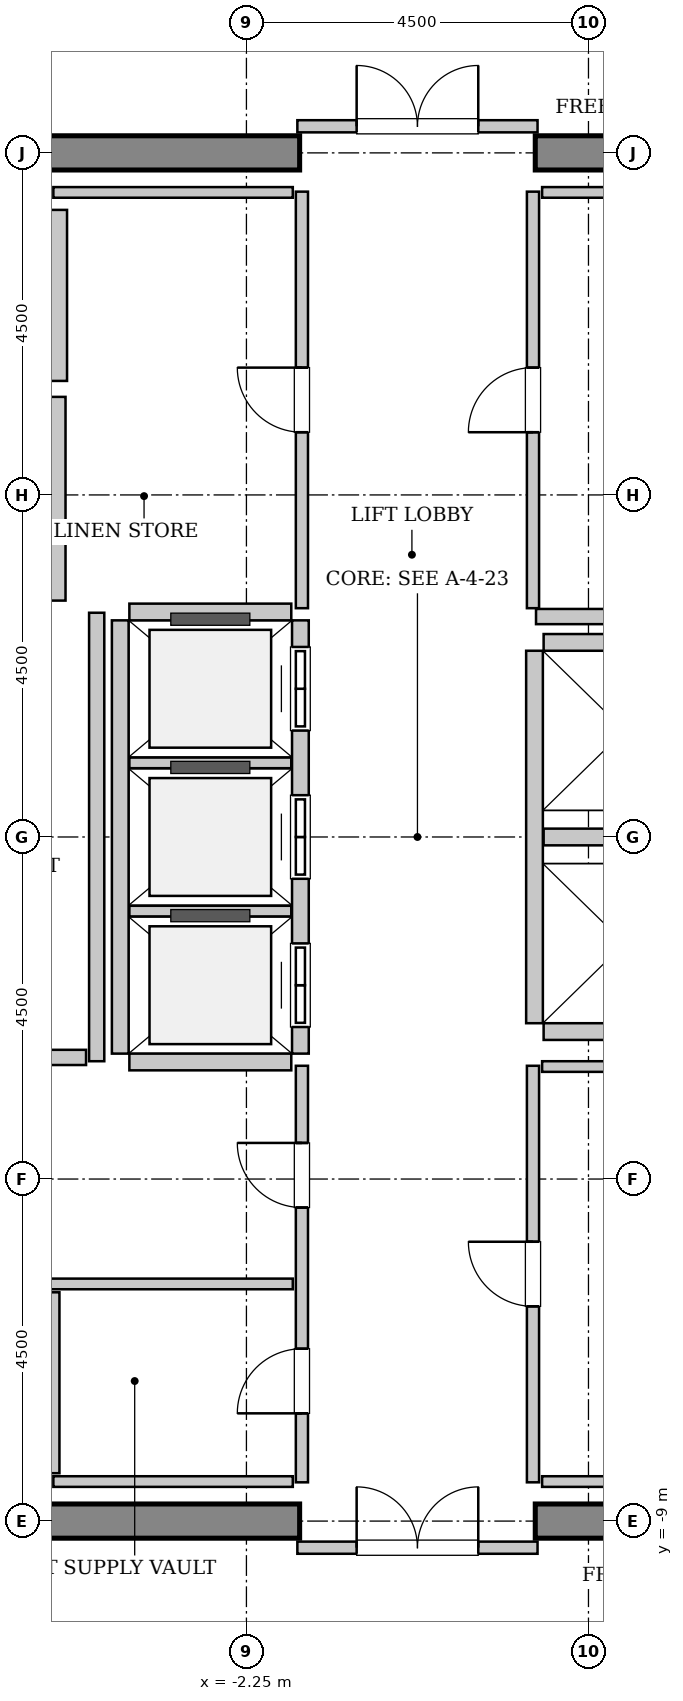
"""IFC4 building model, lengths in metres.
Left out: names, types, materials, properties, quantities, classifications, styles, units other than length and angle.
Written with IfcOpenShell. Run it as: python <this file> out.ifc"""

import sys

from ifc_helpers import new_model, si_unit, direction, frame, frame_2d, origin, place, context, subcontext, project, spatial, rectangle, extrude, source, transform, mapped, element, fill, save


model = new_model("IFC4")
c1 = context("Model", 3, precision=1e-05, world=origin(), true_north=direction((0.0, 1.0)))
c2 = subcontext(c1, "Body", "Model", "MODEL_VIEW")
j1 = project(units=[si_unit("LENGTHUNIT", "METRE"), si_unit("PLANEANGLEUNIT", "RADIAN")], contexts=[c1])
p1 = place(None, origin())
s1 = spatial("IfcSite", under=j1, at=p1, CompositionType="ELEMENT")
p2 = place(p1, origin())
s2 = spatial("IfcBuilding", under=s1, at=p2, CompositionType="ELEMENT")
p3 = place(p2, frame((0.0, 0.0, 291.2)))
s3 = spatial("IfcBuildingStorey", under=s2, at=p3, CompositionType="ELEMENT", Elevation=291.2)
m1 = source(origin(), c2, "Body", "SweptSolid", [
    extrude(rectangle(XDim=9.925, YDim=0.45, at=frame_2d((4.962, 0.0))), origin(), (0.0, 0.0, 1.0), 3.8),
])
for number, where, z_axis, x_axis in (
    (1, (-11.475, 9.0, 0.0), (0.0, 0.0, 1.0), (1.0, 0.0, 0.0)),
    (2, (1.55, 9.0, 0.0), (0.0, 0.0, 1.0), (1.0, 0.0, 0.0)),
    (3, (-11.475, -9.0, 0.0), (0.0, 0.0, 1.0), (1.0, 0.0, 0.0)),
    (4, (1.55, -9.0, 0.0), (0.0, 0.0, 1.0), (1.0, 0.0, 0.0)),
):
    element("IfcWall", number, at=place(p3, frame(where, z_axis=z_axis, x_axis=x_axis)), inside=s3, PredefinedType="SHEAR", context=c2, shape_type="MappedRepresentation", body=[
        mapped(m1, transform((0.0, 0.0, 0.0), x_axis=(1.0, 0.0, 0.0), y_axis=(0.0, 1.0, 0.0), z_axis=(0.0, 0.0, 1.0), scale=1.0)),
    ])
m2 = source(origin(), c2, "Body", "SweptSolid", [
    extrude(rectangle(XDim=2.68, YDim=0.22, at=frame_2d((1.34, 0.0))), origin(), (0.0, 0.0, 1.0), 3.535),
])
p4 = place(p3, frame((-4.74, 3.11, 0.0), z_axis=(0.0, 0.0, 1.0), x_axis=(0.0, 1.0, 0.0)))
e5 = element("IfcWall", 5, at=p4, inside=s3, PredefinedType="SOLIDWALL", context=c2, shape_type="MappedRepresentation", body=[
    mapped(m2, transform((0.0, 0.0, 0.0), x_axis=(1.0, 0.0, 0.0), y_axis=(0.0, 1.0, 0.0), z_axis=(0.0, 0.0, 1.0), scale=1.0)),
])
m3 = source(origin(), c2, "Body", "SweptSolid", [
    extrude(rectangle(XDim=5.7, YDim=0.22, at=frame_2d((2.85, 0.0))), origin(), (0.0, 0.0, 1.0), 3.535),
])
p5 = place(p3, frame((-1.54, -2.85, 0.0), z_axis=(0.0, 0.0, 1.0), x_axis=(0.0, 1.0, 0.0)))
e6 = element("IfcWall", 6, at=p5, inside=s3, PredefinedType="SOLIDWALL", context=c2, shape_type="MappedRepresentation", body=[
    mapped(m3, transform((0.0, 0.0, 0.0), x_axis=(1.0, 0.0, 0.0), y_axis=(0.0, 1.0, 0.0), z_axis=(0.0, 0.0, 1.0), scale=1.0)),
])
p6 = place(p5, frame((0.35, 0.0, 0.0)))
e7 = element("IfcOpeningElement", 7, at=p6, cuts=e6, PredefinedType="OPENING", context=c2, shape_type="SweptSolid", body=[
    extrude(rectangle(XDim=1.1, YDim=2.2, at=frame_2d((0.55, 1.1))), frame((0.0, 0.12, 0.0), z_axis=(0.0, -1.0, 0.0), x_axis=(1.0, 0.0, 0.0)), (0.0, 0.0, 1.0), 0.24),
])
p7 = place(p5, frame((2.3, 0.0, 0.0)))
e8 = element("IfcOpeningElement", 8, at=p7, cuts=e6, PredefinedType="OPENING", context=c2, shape_type="SweptSolid", body=[
    extrude(rectangle(XDim=1.1, YDim=2.2, at=frame_2d((0.55, 1.1))), frame((0.0, 0.12, 0.0), z_axis=(0.0, -1.0, 0.0), x_axis=(1.0, 0.0, 0.0)), (0.0, 0.0, 1.0), 0.24),
])
p8 = place(p5, frame((4.25, 0.0, 0.0)))
e9 = element("IfcOpeningElement", 9, at=p8, cuts=e6, PredefinedType="OPENING", context=c2, shape_type="SweptSolid", body=[
    extrude(rectangle(XDim=1.1, YDim=2.2, at=frame_2d((0.55, 1.1))), frame((0.0, 0.12, 0.0), z_axis=(0.0, -1.0, 0.0), x_axis=(1.0, 0.0, 0.0)), (0.0, 0.0, 1.0), 0.24),
])
p9 = place(p3, frame((-3.91, 2.85, 0.0), z_axis=(0.0, 0.0, 1.0), x_axis=(0.0, -1.0, 0.0)))
e10 = element("IfcWall", 10, at=p9, inside=s3, PredefinedType="SOLIDWALL", context=c2, shape_type="MappedRepresentation", body=[
    mapped(m3, transform((0.0, 0.0, 0.0), x_axis=(1.0, 0.0, 0.0), y_axis=(0.0, 1.0, 0.0), z_axis=(0.0, 0.0, 1.0), scale=1.0)),
])
m4 = source(origin(), c2, "Body", "SweptSolid", [
    extrude(rectangle(XDim=2.13, YDim=0.22, at=frame_2d((1.065, 0.0))), origin(), (0.0, 0.0, 1.0), 3.535),
])
p10 = place(p3, frame((-3.79, -2.96, 0.0), z_axis=(0.0, 0.0, 1.0), x_axis=(1.0, 0.0, 0.0)))
e11 = element("IfcWall", 11, at=p10, inside=s3, PredefinedType="SOLIDWALL", context=c2, shape_type="MappedRepresentation", body=[
    mapped(m4, transform((0.0, 0.0, 0.0), x_axis=(1.0, 0.0, 0.0), y_axis=(0.0, 1.0, 0.0), z_axis=(0.0, 0.0, 1.0), scale=1.0)),
])
m5 = source(origin(), c2, "Body", "SweptSolid", [
    extrude(rectangle(XDim=2.13, YDim=0.14, at=frame_2d((1.065, 0.0))), origin(), (0.0, 0.0, 1.0), 3.535),
])
for number, where, z_axis, x_axis in (
    (12, (-3.79, -0.975, 0.0), (0.0, 0.0, 1.0), (1.0, 0.0, 0.0)),
    (13, (-3.79, 0.975, 0.0), (0.0, 0.0, 1.0), (1.0, 0.0, 0.0)),
):
    element("IfcWall", number, at=place(p3, frame(where, z_axis=z_axis, x_axis=x_axis)), inside=s3, PredefinedType="PARTITIONING", context=c2, shape_type="MappedRepresentation", body=[
        mapped(m5, transform((0.0, 0.0, 0.0), x_axis=(1.0, 0.0, 0.0), y_axis=(0.0, 1.0, 0.0), z_axis=(0.0, 0.0, 1.0), scale=1.0)),
    ])
p11 = place(p3, frame((-1.66, 2.96, 0.0), z_axis=(0.0, 0.0, 1.0), x_axis=(-1.0, 0.0, 0.0)))
e14 = element("IfcWall", 14, at=p11, inside=s3, PredefinedType="SOLIDWALL", context=c2, shape_type="MappedRepresentation", body=[
    mapped(m4, transform((0.0, 0.0, 0.0), x_axis=(1.0, 0.0, 0.0), y_axis=(0.0, 1.0, 0.0), z_axis=(0.0, 0.0, 1.0), scale=1.0)),
])
m6 = source(origin(), c2, "Body", "SweptSolid", [
    extrude(rectangle(XDim=4.9, YDim=0.22, at=frame_2d((2.45, 0.0))), origin(), (0.0, 0.0, 1.0), 3.535),
])
p12 = place(p3, frame((1.54, 2.45, 0.0), z_axis=(0.0, 0.0, 1.0), x_axis=(0.0, -1.0, 0.0)))
e15 = element("IfcWall", 15, at=p12, inside=s3, PredefinedType="SOLIDWALL", context=c2, shape_type="MappedRepresentation", body=[
    mapped(m6, transform((0.0, 0.0, 0.0), x_axis=(1.0, 0.0, 0.0), y_axis=(0.0, 1.0, 0.0), z_axis=(0.0, 0.0, 1.0), scale=1.0)),
])
for number, where, z_axis, x_axis in (
    (16, (1.66, -2.56, 0.0), (0.0, 0.0, 1.0), (1.0, 0.0, 0.0)),
    (17, (1.66, 0.0, 0.0), (0.0, 0.0, 1.0), (1.0, 0.0, 0.0)),
    (18, (3.79, 2.56, 0.0), (0.0, 0.0, 1.0), (-1.0, 0.0, 0.0)),
):
    element("IfcWall", number, at=place(p3, frame(where, z_axis=z_axis, x_axis=x_axis)), inside=s3, PredefinedType="SOLIDWALL", context=c2, shape_type="MappedRepresentation", body=[
        mapped(m4, transform((0.0, 0.0, 0.0), x_axis=(1.0, 0.0, 0.0), y_axis=(0.0, 1.0, 0.0), z_axis=(0.0, 0.0, 1.0), scale=1.0)),
    ])
m7 = source(origin(), c2, "Body", "SweptSolid", [
    extrude(rectangle(XDim=2.25, YDim=0.22, at=frame_2d((1.125, 0.0))), origin(), (0.0, 0.0, 1.0), 3.535),
])
p13 = place(p3, frame((-4.72, 6.0, 0.0), z_axis=(0.0, 0.0, 1.0), x_axis=(0.0, 1.0, 0.0)))
e19 = element("IfcWall", 19, at=p13, inside=s3, PredefinedType="SOLIDWALL", context=c2, shape_type="MappedRepresentation", body=[
    mapped(m7, transform((0.0, 0.0, 0.0), x_axis=(1.0, 0.0, 0.0), y_axis=(0.0, 1.0, 0.0), z_axis=(0.0, 0.0, 1.0), scale=1.0)),
])
m8 = source(origin(), c2, "Body", "SweptSolid", [
    extrude(rectangle(XDim=5.9, YDim=0.2, at=frame_2d((2.95, 0.0))), origin(), (0.0, 0.0, 1.0), 3.535),
])
p14 = place(p3, frame((-4.22, -2.95, 0.0), z_axis=(0.0, 0.0, 1.0), x_axis=(0.0, 1.0, 0.0)))
e20 = element("IfcWall", 20, at=p14, inside=s3, PredefinedType="PARTITIONING", context=c2, shape_type="MappedRepresentation", body=[
    mapped(m8, transform((0.0, 0.0, 0.0), x_axis=(1.0, 0.0, 0.0), y_axis=(0.0, 1.0, 0.0), z_axis=(0.0, 0.0, 1.0), scale=1.0)),
])
m9 = source(origin(), c2, "Body", "SweptSolid", [
    extrude(rectangle(XDim=2.9, YDim=0.2, at=frame_2d((1.45, 0.0))), origin(), (0.0, 0.0, 1.0), 3.535),
])
p15 = place(p3, frame((-7.26, -2.9, 0.0), z_axis=(0.0, 0.0, 1.0), x_axis=(1.0, 0.0, 0.0)))
e21 = element("IfcWall", 21, at=p15, inside=s3, PredefinedType="PARTITIONING", context=c2, shape_type="MappedRepresentation", body=[
    mapped(m9, transform((0.0, 0.0, 0.0), x_axis=(1.0, 0.0, 0.0), y_axis=(0.0, 1.0, 0.0), z_axis=(0.0, 0.0, 1.0), scale=1.0)),
])
m10 = source(origin(), c2, "Body", "SweptSolid", [
    extrude(rectangle(XDim=2.52, YDim=0.2, at=frame_2d((1.26, 0.0))), origin(), (0.0, 0.0, 1.0), 3.535),
])
p16 = place(p3, frame((1.56, 2.9, 0.0), z_axis=(0.0, 0.0, 1.0), x_axis=(1.0, 0.0, 0.0)))
e22 = element("IfcWall", 22, at=p16, inside=s3, PredefinedType="PARTITIONING", context=c2, shape_type="MappedRepresentation", body=[
    mapped(m10, transform((0.0, 0.0, 0.0), x_axis=(1.0, 0.0, 0.0), y_axis=(0.0, 1.0, 0.0), z_axis=(0.0, 0.0, 1.0), scale=1.0)),
])
m11 = source(origin(), c2, "Body", "SweptSolid", [
    extrude(rectangle(XDim=3.16, YDim=0.16, at=frame_2d((1.58, 0.0))), origin(), (0.0, 0.0, 1.0), 2.625),
])
p17 = place(p3, frame((-1.58, 9.35, 0.0), z_axis=(0.0, 0.0, 1.0), x_axis=(1.0, 0.0, 0.0)))
e23 = element("IfcWall", 23, at=p17, inside=s3, PredefinedType="PARTITIONING", context=c2, shape_type="MappedRepresentation", body=[
    mapped(m11, transform((0.0, 0.0, 0.0), x_axis=(1.0, 0.0, 0.0), y_axis=(0.0, 1.0, 0.0), z_axis=(0.0, 0.0, 1.0), scale=1.0)),
])
p18 = place(p17, frame((0.78, 0.0, 0.0)))
e24 = element("IfcOpeningElement", 24, at=p18, cuts=e23, PredefinedType="OPENING", context=c2, shape_type="SweptSolid", body=[
    extrude(rectangle(XDim=1.6, YDim=2.3, at=frame_2d((0.8, 1.15))), frame((0.0, 0.09, 0.0), z_axis=(0.0, -1.0, 0.0), x_axis=(1.0, 0.0, 0.0)), (0.0, 0.0, 1.0), 0.18),
])
p19 = place(p3, frame((-1.58, -9.35, 0.0), z_axis=(0.0, 0.0, 1.0), x_axis=(1.0, 0.0, 0.0)))
e25 = element("IfcWall", 25, at=p19, inside=s3, PredefinedType="PARTITIONING", context=c2, shape_type="MappedRepresentation", body=[
    mapped(m11, transform((0.0, 0.0, 0.0), x_axis=(1.0, 0.0, 0.0), y_axis=(0.0, 1.0, 0.0), z_axis=(0.0, 0.0, 1.0), scale=1.0)),
])
p20 = place(p19, frame((0.78, 0.0, 0.0)))
e26 = element("IfcOpeningElement", 26, at=p20, cuts=e25, PredefinedType="OPENING", context=c2, shape_type="SweptSolid", body=[
    extrude(rectangle(XDim=1.6, YDim=2.3, at=frame_2d((0.8, 1.15))), frame((0.0, 0.09, 0.0), z_axis=(0.0, -1.0, 0.0), x_axis=(1.0, 0.0, 0.0)), (0.0, 0.0, 1.0), 0.18),
])
m12 = source(origin(), c2, "Body", "SweptSolid", [
    extrude(rectangle(XDim=5.48, YDim=0.16, at=frame_2d((2.74, 0.0))), origin(), (0.0, 0.0, 1.0), 3.535),
])
p21 = place(p3, frame((-1.52, 3.01, 0.0), z_axis=(0.0, 0.0, 1.0), x_axis=(0.0, 1.0, 0.0)))
e27 = element("IfcWall", 27, at=p21, inside=s3, PredefinedType="PARTITIONING", context=c2, shape_type="MappedRepresentation", body=[
    mapped(m12, transform((0.0, 0.0, 0.0), x_axis=(1.0, 0.0, 0.0), y_axis=(0.0, 1.0, 0.0), z_axis=(0.0, 0.0, 1.0), scale=1.0)),
])
p22 = place(p21, frame((2.315, 0.0, 0.0)))
e28 = element("IfcOpeningElement", 28, at=p22, cuts=e27, PredefinedType="OPENING", context=c2, shape_type="SweptSolid", body=[
    extrude(rectangle(XDim=0.85, YDim=2.1, at=frame_2d((0.425, 1.05))), frame((0.0, 0.09, 0.0), z_axis=(0.0, -1.0, 0.0), x_axis=(1.0, 0.0, 0.0)), (0.0, 0.0, 1.0), 0.18),
])
m13 = source(origin(), c2, "Body", "SweptSolid", [
    extrude(rectangle(XDim=3.15, YDim=0.14, at=frame_2d((1.575, 0.0))), origin(), (0.0, 0.0, 1.0), 3.535),
])
p23 = place(p3, frame((-4.79, 8.48, 0.0), z_axis=(0.0, 0.0, 1.0), x_axis=(1.0, 0.0, 0.0)))
e29 = element("IfcWall", 29, at=p23, inside=s3, PredefinedType="PARTITIONING", context=c2, shape_type="MappedRepresentation", body=[
    mapped(m13, transform((0.0, 0.0, 0.0), x_axis=(1.0, 0.0, 0.0), y_axis=(0.0, 1.0, 0.0), z_axis=(0.0, 0.0, 1.0), scale=1.0)),
])
p24 = place(p3, frame((-1.52, -8.49, 0.0), z_axis=(0.0, 0.0, 1.0), x_axis=(0.0, 1.0, 0.0)))
e30 = element("IfcWall", 30, at=p24, inside=s3, PredefinedType="PARTITIONING", context=c2, shape_type="MappedRepresentation", body=[
    mapped(m12, transform((0.0, 0.0, 0.0), x_axis=(1.0, 0.0, 0.0), y_axis=(0.0, 1.0, 0.0), z_axis=(0.0, 0.0, 1.0), scale=1.0)),
])
p25 = place(p24, frame((0.907, 0.0, 0.0)))
e31 = element("IfcOpeningElement", 31, at=p25, cuts=e30, PredefinedType="OPENING", context=c2, shape_type="SweptSolid", body=[
    extrude(rectangle(XDim=0.85, YDim=2.1, at=frame_2d((0.425, 1.05))), frame((0.0, 0.09, 0.0), z_axis=(0.0, -1.0, 0.0), x_axis=(1.0, 0.0, 0.0)), (0.0, 0.0, 1.0), 0.18),
])
p26 = place(p24, frame((3.615, 0.0, 0.0)))
e32 = element("IfcOpeningElement", 32, at=p26, cuts=e30, PredefinedType="OPENING", context=c2, shape_type="SweptSolid", body=[
    extrude(rectangle(XDim=0.85, YDim=2.1, at=frame_2d((0.425, 1.05))), frame((0.0, 0.09, 0.0), z_axis=(0.0, -1.0, 0.0), x_axis=(1.0, 0.0, 0.0)), (0.0, 0.0, 1.0), 0.18),
])
m14 = source(origin(), c2, "Body", "SweptSolid", [
    extrude(rectangle(XDim=5.55, YDim=0.14, at=frame_2d((2.775, 0.0))), origin(), (0.0, 0.0, 1.0), 3.535),
])
p27 = place(p3, frame((-7.19, -5.88, 0.0), z_axis=(0.0, 0.0, 1.0), x_axis=(1.0, 0.0, 0.0)))
e33 = element("IfcWall", 33, at=p27, inside=s3, PredefinedType="PARTITIONING", context=c2, shape_type="MappedRepresentation", body=[
    mapped(m14, transform((0.0, 0.0, 0.0), x_axis=(1.0, 0.0, 0.0), y_axis=(0.0, 1.0, 0.0), z_axis=(0.0, 0.0, 1.0), scale=1.0)),
])
p28 = place(p3, frame((1.52, 3.01, 0.0), z_axis=(0.0, 0.0, 1.0), x_axis=(0.0, 1.0, 0.0)))
e34 = element("IfcWall", 34, at=p28, inside=s3, PredefinedType="PARTITIONING", context=c2, shape_type="MappedRepresentation", body=[
    mapped(m12, transform((0.0, 0.0, 0.0), x_axis=(1.0, 0.0, 0.0), y_axis=(0.0, 1.0, 0.0), z_axis=(0.0, 0.0, 1.0), scale=1.0)),
])
p29 = place(p28, frame((2.315, 0.0, 0.0)))
e35 = element("IfcOpeningElement", 35, at=p29, cuts=e34, PredefinedType="OPENING", context=c2, shape_type="SweptSolid", body=[
    extrude(rectangle(XDim=0.85, YDim=2.1, at=frame_2d((0.425, 1.05))), frame((0.0, 0.09, 0.0), z_axis=(0.0, -1.0, 0.0), x_axis=(1.0, 0.0, 0.0)), (0.0, 0.0, 1.0), 0.18),
])
for number, where, z_axis, x_axis in (
    (36, (1.64, 8.48, 0.0), (0.0, 0.0, 1.0), (1.0, 0.0, 0.0)),
    (37, (-4.79, -8.48, 0.0), (0.0, 0.0, 1.0), (1.0, 0.0, 0.0)),
):
    element("IfcWall", number, at=place(p3, frame(where, z_axis=z_axis, x_axis=x_axis)), inside=s3, PredefinedType="PARTITIONING", context=c2, shape_type="MappedRepresentation", body=[
        mapped(m13, transform((0.0, 0.0, 0.0), x_axis=(1.0, 0.0, 0.0), y_axis=(0.0, 1.0, 0.0), z_axis=(0.0, 0.0, 1.0), scale=1.0)),
    ])
m15 = source(origin(), c2, "Body", "SweptSolid", [
    extrude(rectangle(XDim=2.38, YDim=0.14, at=frame_2d((1.19, 0.0))), origin(), (0.0, 0.0, 1.0), 3.535),
])
p30 = place(p3, frame((-4.78, -8.37, 0.0), z_axis=(0.0, 0.0, 1.0), x_axis=(0.0, 1.0, 0.0)))
e38 = element("IfcWall", 38, at=p30, inside=s3, PredefinedType="PARTITIONING", context=c2, shape_type="MappedRepresentation", body=[
    mapped(m15, transform((0.0, 0.0, 0.0), x_axis=(1.0, 0.0, 0.0), y_axis=(0.0, 1.0, 0.0), z_axis=(0.0, 0.0, 1.0), scale=1.0)),
])
p31 = place(p3, frame((1.52, -8.49, 0.0), z_axis=(0.0, 0.0, 1.0), x_axis=(0.0, 1.0, 0.0)))
e39 = element("IfcWall", 39, at=p31, inside=s3, PredefinedType="PARTITIONING", context=c2, shape_type="MappedRepresentation", body=[
    mapped(m12, transform((0.0, 0.0, 0.0), x_axis=(1.0, 0.0, 0.0), y_axis=(0.0, 1.0, 0.0), z_axis=(0.0, 0.0, 1.0), scale=1.0)),
])
p32 = place(p31, frame((2.315, 0.0, 0.0)))
e40 = element("IfcOpeningElement", 40, at=p32, cuts=e39, PredefinedType="OPENING", context=c2, shape_type="SweptSolid", body=[
    extrude(rectangle(XDim=0.85, YDim=2.1, at=frame_2d((0.425, 1.05))), frame((0.0, 0.09, 0.0), z_axis=(0.0, -1.0, 0.0), x_axis=(1.0, 0.0, 0.0)), (0.0, 0.0, 1.0), 0.18),
])
for number, where, z_axis, x_axis in (
    (41, (1.64, -3.02, 0.0), (0.0, 0.0, 1.0), (1.0, 0.0, 0.0)),
    (42, (1.64, -8.48, 0.0), (0.0, 0.0, 1.0), (1.0, 0.0, 0.0)),
):
    element("IfcWall", number, at=place(p3, frame(where, z_axis=z_axis, x_axis=x_axis)), inside=s3, PredefinedType="PARTITIONING", context=c2, shape_type="MappedRepresentation", body=[
        mapped(m13, transform((0.0, 0.0, 0.0), x_axis=(1.0, 0.0, 0.0), y_axis=(0.0, 1.0, 0.0), z_axis=(0.0, 0.0, 1.0), scale=1.0)),
    ])
m16 = source(origin(), c2, "Body", "SweptSolid", [
    extrude(rectangle(XDim=1.1, YDim=2.2, at=frame_2d((0.55, 1.1))), frame((0.0, 0.025, 0.0), z_axis=(0.0, -1.0, 0.0), x_axis=(1.0, 0.0, 0.0)), (0.0, 0.0, 1.0), 0.05),
])
p33 = place(p6, origin())
e43 = element("IfcDoor", 43, at=p33, inside=s3, OperationType="DOUBLE_DOOR_SLIDING", PredefinedType="DOOR", context=c2, shape_type="MappedRepresentation", body=[
    mapped(m16, transform((0.0, 0.0, 0.0), x_axis=(1.0, 0.0, 0.0), y_axis=(0.0, 1.0, 0.0), z_axis=(0.0, 0.0, 1.0), scale=1.0)),
])
fill(e7, e43)
p34 = place(p7, origin())
e44 = element("IfcDoor", 44, at=p34, inside=s3, OperationType="DOUBLE_DOOR_SLIDING", PredefinedType="DOOR", context=c2, shape_type="MappedRepresentation", body=[
    mapped(m16, transform((0.0, 0.0, 0.0), x_axis=(1.0, 0.0, 0.0), y_axis=(0.0, 1.0, 0.0), z_axis=(0.0, 0.0, 1.0), scale=1.0)),
])
fill(e8, e44)
p35 = place(p8, origin())
e45 = element("IfcDoor", 45, at=p35, inside=s3, OperationType="DOUBLE_DOOR_SLIDING", PredefinedType="DOOR", context=c2, shape_type="MappedRepresentation", body=[
    mapped(m16, transform((0.0, 0.0, 0.0), x_axis=(1.0, 0.0, 0.0), y_axis=(0.0, 1.0, 0.0), z_axis=(0.0, 0.0, 1.0), scale=1.0)),
])
fill(e9, e45)
m17 = source(origin(), c2, "Body", "SweptSolid", [
    extrude(rectangle(XDim=1.6, YDim=2.3, at=frame_2d((0.8, 1.15))), frame((0.0, 0.025, 0.0), z_axis=(0.0, -1.0, 0.0), x_axis=(1.0, 0.0, 0.0)), (0.0, 0.0, 1.0), 0.05),
])
p36 = place(p18, origin())
e46 = element("IfcDoor", 46, at=p36, inside=s3, OperationType="DOUBLE_DOOR_SINGLE_SWING", PredefinedType="DOOR", context=c2, shape_type="MappedRepresentation", body=[
    mapped(m17, transform((0.0, 0.0, 0.0), x_axis=(1.0, 0.0, 0.0), y_axis=(0.0, 1.0, 0.0), z_axis=(0.0, 0.0, 1.0), scale=1.0)),
])
fill(e24, e46)
p37 = place(p20, origin())
e47 = element("IfcDoor", 47, at=p37, inside=s3, OperationType="DOUBLE_DOOR_SINGLE_SWING", PredefinedType="DOOR", context=c2, shape_type="MappedRepresentation", body=[
    mapped(m17, transform((0.0, 0.0, 0.0), x_axis=(1.0, 0.0, 0.0), y_axis=(0.0, 1.0, 0.0), z_axis=(0.0, 0.0, 1.0), scale=1.0)),
])
fill(e26, e47)
m18 = source(origin(), c2, "Body", "SweptSolid", [
    extrude(rectangle(XDim=0.85, YDim=2.1, at=frame_2d((0.425, 1.05))), frame((0.0, 0.025, 0.0), z_axis=(0.0, -1.0, 0.0), x_axis=(1.0, 0.0, 0.0)), (0.0, 0.0, 1.0), 0.05),
])
p38 = place(p22, origin())
e48 = element("IfcDoor", 48, at=p38, inside=s3, OperationType="SINGLE_SWING_RIGHT", PredefinedType="DOOR", context=c2, shape_type="MappedRepresentation", body=[
    mapped(m18, transform((0.0, 0.0, 0.0), x_axis=(1.0, 0.0, 0.0), y_axis=(0.0, 1.0, 0.0), z_axis=(0.0, 0.0, 1.0), scale=1.0)),
])
fill(e28, e48)
p39 = place(p25, origin())
e49 = element("IfcDoor", 49, at=p39, inside=s3, OperationType="SINGLE_SWING_LEFT", PredefinedType="DOOR", context=c2, shape_type="MappedRepresentation", body=[
    mapped(m18, transform((0.0, 0.0, 0.0), x_axis=(1.0, 0.0, 0.0), y_axis=(0.0, 1.0, 0.0), z_axis=(0.0, 0.0, 1.0), scale=1.0)),
])
fill(e31, e49)
p40 = place(p26, origin())
e50 = element("IfcDoor", 50, at=p40, inside=s3, OperationType="SINGLE_SWING_RIGHT", PredefinedType="DOOR", context=c2, shape_type="MappedRepresentation", body=[
    mapped(m18, transform((0.0, 0.0, 0.0), x_axis=(1.0, 0.0, 0.0), y_axis=(0.0, 1.0, 0.0), z_axis=(0.0, 0.0, 1.0), scale=1.0)),
])
fill(e32, e50)
p41 = place(p29, origin())
e51 = element("IfcDoor", 51, at=p41, inside=s3, OperationType="SINGLE_SWING_LEFT", PredefinedType="DOOR", context=c2, shape_type="MappedRepresentation", body=[
    mapped(m18, transform((0.0, 0.0, 0.0), x_axis=(1.0, 0.0, 0.0), y_axis=(0.0, 1.0, 0.0), z_axis=(0.0, 0.0, 1.0), scale=1.0)),
])
fill(e35, e51)
p42 = place(p32, origin())
e52 = element("IfcDoor", 52, at=p42, inside=s3, OperationType="SINGLE_SWING_RIGHT", PredefinedType="DOOR", context=c2, shape_type="MappedRepresentation", body=[
    mapped(m18, transform((0.0, 0.0, 0.0), x_axis=(1.0, 0.0, 0.0), y_axis=(0.0, 1.0, 0.0), z_axis=(0.0, 0.0, 1.0), scale=1.0)),
])
fill(e40, e52)
save(model, sys.argv[1])
